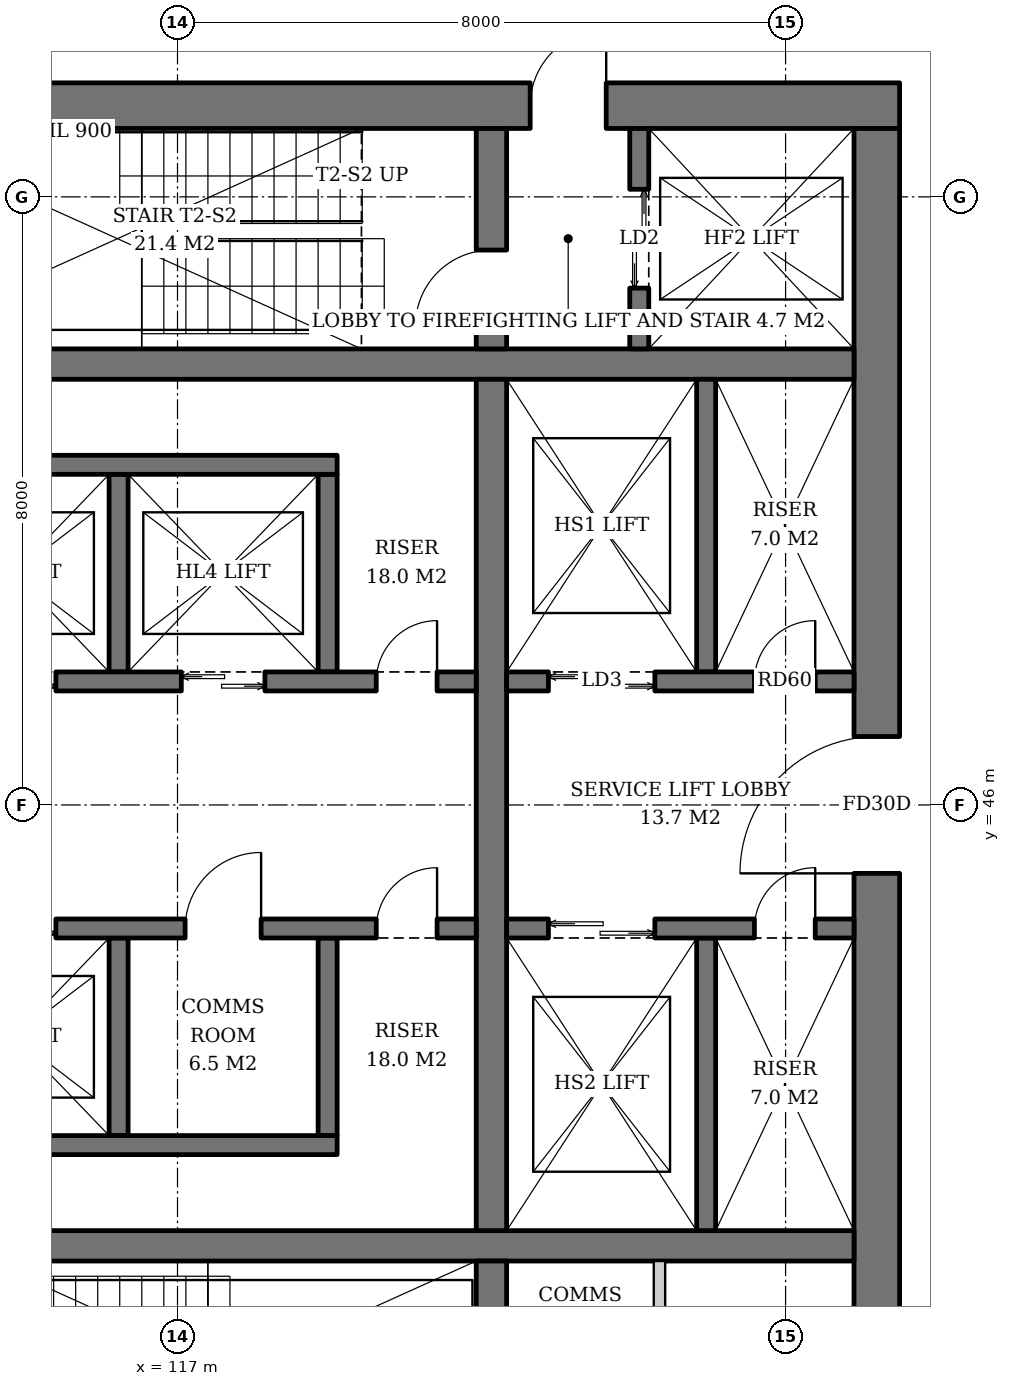
"""IFC4 building model, lengths in metres.
Left out: names, types, materials, properties, quantities, classifications, styles, units other than length and angle.
Written with IfcOpenShell. Run it as: python <this file> out.ifc"""

import sys

from ifc_helpers import new_model, si_unit, direction, frame, frame_2d, origin, place, context, subcontext, project, spatial, rectangle, extrude, element, fill, save


model = new_model("IFC4")
c1 = context("Model", 3, precision=1e-05, world=origin(), true_north=direction((0.0, 1.0)))
c2 = subcontext(c1, "Body", "Model", "MODEL_VIEW")
j1 = project(units=[si_unit("LENGTHUNIT", "METRE"), si_unit("PLANEANGLEUNIT", "RADIAN")], contexts=[c1])
p1 = place(None, origin())
s1 = spatial("IfcSite", under=j1, at=p1, CompositionType="ELEMENT")
p2 = place(p1, origin())
s2 = spatial("IfcBuilding", under=s1, at=p2, CompositionType="ELEMENT")
p3 = place(p2, frame((0.0, 0.0, 51.4)))
s3 = spatial("IfcBuildingStorey", under=s2, at=p3, CompositionType="ELEMENT", Elevation=51.4)
p4 = place(p3, frame((107.5, 55.2, 0.0), z_axis=(0.0, 0.0, 1.0), x_axis=(1.0, 0.0, 0.0)))
e1 = element("IfcWall", 1, at=p4, inside=s3, PredefinedType="SHEAR", context=c2, shape_type="SweptSolid", body=[
    extrude(rectangle(XDim=19.0, YDim=0.6, at=frame_2d((9.5, 0.0))), origin(), (0.0, 0.0, 1.0), 3.8),
])
p5 = place(p4, frame((14.14, 0.0, 0.0)))
e2 = element("IfcOpeningElement", 2, at=p5, cuts=e1, PredefinedType="OPENING", context=c2, shape_type="SweptSolid", body=[
    extrude(rectangle(XDim=1.0, YDim=2.1, at=frame_2d((0.5, 1.05))), frame((0.0, 0.31, 0.0), z_axis=(0.0, -1.0, 0.0), x_axis=(1.0, 0.0, 0.0)), (0.0, 0.0, 1.0), 0.62),
])
p6 = place(p4, frame((2.425, 0.0, 0.0)))
e3 = element("IfcOpeningElement", 3, at=p6, cuts=e1, PredefinedType="OPENING", context=c2, shape_type="SweptSolid", body=[
    extrude(rectangle(XDim=1.0, YDim=2.1, at=frame_2d((0.5, 1.05))), frame((0.0, 0.31, 0.0), z_axis=(0.0, -1.0, 0.0), x_axis=(1.0, 0.0, 0.0)), (0.0, 0.0, 1.0), 0.62),
])
p7 = place(p3, frame((126.2, 37.1, 0.0), z_axis=(0.0, 0.0, 1.0), x_axis=(0.0, 1.0, 0.0)))
e4 = element("IfcWall", 4, at=p7, inside=s3, PredefinedType="SHEAR", context=c2, shape_type="SweptSolid", body=[
    extrude(rectangle(XDim=17.8, YDim=0.6, at=frame_2d((8.9, 0.0))), origin(), (0.0, 0.0, 1.0), 3.8),
])
p8 = place(p7, frame((8.0, 0.0, 0.0)))
e5 = element("IfcOpeningElement", 5, at=p8, cuts=e4, PredefinedType="OPENING", context=c2, shape_type="SweptSolid", body=[
    extrude(rectangle(XDim=1.8, YDim=2.4, at=frame_2d((0.9, 1.2))), frame((0.0, 0.31, 0.0), z_axis=(0.0, -1.0, 0.0), x_axis=(1.0, 0.0, 0.0)), (0.0, 0.0, 1.0), 0.62),
])
for number, where, z_axis, x_axis in (
    (6, (108.1, 40.2, 0.0), (0.0, 0.0, 1.0), (1.0, 0.0, 0.0)),
    (7, (108.1, 51.8, 0.0), (0.0, 0.0, 1.0), (1.0, 0.0, 0.0)),
):
    element("IfcWall", number, at=place(p3, frame(where, z_axis=z_axis, x_axis=x_axis)), inside=s3, PredefinedType="SHEAR", context=c2, shape_type="SweptSolid", body=[
        extrude(rectangle(XDim=17.8, YDim=0.4, at=frame_2d((8.9, 0.0))), origin(), (0.0, 0.0, 1.0), 3.8),
    ])
p9 = place(p3, frame((121.13, 37.1, 0.0), z_axis=(0.0, 0.0, 1.0), x_axis=(0.0, 1.0, 0.0)))
e8 = element("IfcWall", 8, at=p9, inside=s3, PredefinedType="SHEAR", context=c2, shape_type="SweptSolid", body=[
    extrude(rectangle(XDim=2.9, YDim=0.4, at=frame_2d((1.45, 0.0))), origin(), (0.0, 0.0, 1.0), 3.8),
])
p10 = place(p3, frame((121.13, 40.4, 0.0), z_axis=(0.0, 0.0, 1.0), x_axis=(0.0, 1.0, 0.0)))
e9 = element("IfcWall", 9, at=p10, inside=s3, PredefinedType="SHEAR", context=c2, shape_type="SweptSolid", body=[
    extrude(rectangle(XDim=11.2, YDim=0.4, at=frame_2d((5.6, 0.0))), origin(), (0.0, 0.0, 1.0), 3.8),
])
p11 = place(p3, frame((121.13, 52.0, 0.0), z_axis=(0.0, 0.0, 1.0), x_axis=(0.0, 1.0, 0.0)))
e10 = element("IfcWall", 10, at=p11, inside=s3, PredefinedType="SHEAR", context=c2, shape_type="SweptSolid", body=[
    extrude(rectangle(XDim=2.9, YDim=0.4, at=frame_2d((1.45, 0.0))), origin(), (0.0, 0.0, 1.0), 3.8),
])
p12 = place(p11, frame((0.3, 0.0, 0.0)))
e11 = element("IfcOpeningElement", 11, at=p12, cuts=e10, PredefinedType="OPENING", context=c2, shape_type="SweptSolid", body=[
    extrude(rectangle(XDim=1.0, YDim=2.1, at=frame_2d((0.5, 1.05))), frame((0.0, 0.21, 0.0), z_axis=(0.0, -1.0, 0.0), x_axis=(1.0, 0.0, 0.0)), (0.0, 0.0, 1.0), 0.42),
])
p13 = place(p3, frame((123.075, 52.0, 0.0), z_axis=(0.0, 0.0, 1.0), x_axis=(0.0, 1.0, 0.0)))
e12 = element("IfcWall", 12, at=p13, inside=s3, PredefinedType="SHEAR", context=c2, shape_type="SweptSolid", body=[
    extrude(rectangle(XDim=2.9, YDim=0.25, at=frame_2d((1.45, 0.0))), origin(), (0.0, 0.0, 1.0), 3.8),
])
p14 = place(p13, frame((0.8, 0.0, 0.0)))
e13 = element("IfcOpeningElement", 13, at=p14, cuts=e12, PredefinedType="OPENING", context=c2, shape_type="SweptSolid", body=[
    extrude(rectangle(XDim=1.3, YDim=2.2, at=frame_2d((0.65, 1.1))), frame((0.0, 0.135, 0.0), z_axis=(0.0, -1.0, 0.0), x_axis=(1.0, 0.0, 0.0)), (0.0, 0.0, 1.0), 0.27),
])
for number, where, z_axis, x_axis in (
    (14, (116.225, 47.75, 0.0), (0.0, 0.0, 1.0), (0.0, 1.0, 0.0)),
    (15, (118.975, 47.75, 0.0), (0.0, 0.0, 1.0), (0.0, 1.0, 0.0)),
):
    element("IfcWall", number, at=place(p3, frame(where, z_axis=z_axis, x_axis=x_axis)), inside=s3, PredefinedType="SHEAR", context=c2, shape_type="SweptSolid", body=[
        extrude(rectangle(XDim=2.6, YDim=0.25, at=frame_2d((1.3, 0.0))), origin(), (0.0, 0.0, 1.0), 3.8),
    ])
p15 = place(p3, frame((108.1, 50.475, 0.0), z_axis=(0.0, 0.0, 1.0), x_axis=(1.0, 0.0, 0.0)))
e16 = element("IfcWall", 16, at=p15, inside=s3, PredefinedType="SHEAR", context=c2, shape_type="SweptSolid", body=[
    extrude(rectangle(XDim=11.0, YDim=0.25, at=frame_2d((5.5, 0.0))), origin(), (0.0, 0.0, 1.0), 3.8),
])
p16 = place(p3, frame((108.1, 47.625, 0.0), z_axis=(0.0, 0.0, 1.0), x_axis=(1.0, 0.0, 0.0)))
e17 = element("IfcWall", 17, at=p16, inside=s3, PredefinedType="SHEAR", context=c2, shape_type="SweptSolid", body=[
    extrude(rectangle(XDim=12.83, YDim=0.25, at=frame_2d((6.415, 0.0))), origin(), (0.0, 0.0, 1.0), 3.8),
])
p17 = place(p16, frame((0.7, 0.0, 0.0)))
e18 = element("IfcOpeningElement", 18, at=p17, cuts=e17, PredefinedType="OPENING", context=c2, shape_type="SweptSolid", body=[
    extrude(rectangle(XDim=1.1, YDim=2.2, at=frame_2d((0.55, 1.1))), frame((0.0, 0.135, 0.0), z_axis=(0.0, -1.0, 0.0), x_axis=(1.0, 0.0, 0.0)), (0.0, 0.0, 1.0), 0.27),
])
p18 = place(p16, frame((3.45, 0.0, 0.0)))
e19 = element("IfcOpeningElement", 19, at=p18, cuts=e17, PredefinedType="OPENING", context=c2, shape_type="SweptSolid", body=[
    extrude(rectangle(XDim=1.1, YDim=2.2, at=frame_2d((0.55, 1.1))), frame((0.0, 0.135, 0.0), z_axis=(0.0, -1.0, 0.0), x_axis=(1.0, 0.0, 0.0)), (0.0, 0.0, 1.0), 0.27),
])
p19 = place(p16, frame((6.2, 0.0, 0.0)))
e20 = element("IfcOpeningElement", 20, at=p19, cuts=e17, PredefinedType="OPENING", context=c2, shape_type="SweptSolid", body=[
    extrude(rectangle(XDim=1.1, YDim=2.2, at=frame_2d((0.55, 1.1))), frame((0.0, 0.135, 0.0), z_axis=(0.0, -1.0, 0.0), x_axis=(1.0, 0.0, 0.0)), (0.0, 0.0, 1.0), 0.27),
])
p20 = place(p16, frame((8.95, 0.0, 0.0)))
e21 = element("IfcOpeningElement", 21, at=p20, cuts=e17, PredefinedType="OPENING", context=c2, shape_type="SweptSolid", body=[
    extrude(rectangle(XDim=1.1, YDim=2.2, at=frame_2d((0.55, 1.1))), frame((0.0, 0.135, 0.0), z_axis=(0.0, -1.0, 0.0), x_axis=(1.0, 0.0, 0.0)), (0.0, 0.0, 1.0), 0.27),
])
p21 = place(p16, frame((11.515, 0.0, 0.0)))
e22 = element("IfcOpeningElement", 22, at=p21, cuts=e17, PredefinedType="OPENING", context=c2, shape_type="SweptSolid", body=[
    extrude(rectangle(XDim=0.8, YDim=2.0, at=frame_2d((0.4, 1.0))), frame((0.0, 0.135, 0.0), z_axis=(0.0, -1.0, 0.0), x_axis=(1.0, 0.0, 0.0)), (0.0, 0.0, 1.0), 0.27),
])
for number, where, z_axis, x_axis in (
    (23, (116.225, 44.25, 0.0), (0.0, 0.0, 1.0), (0.0, -1.0, 0.0)),
    (24, (118.975, 44.25, 0.0), (0.0, 0.0, 1.0), (0.0, -1.0, 0.0)),
):
    element("IfcWall", number, at=place(p3, frame(where, z_axis=z_axis, x_axis=x_axis)), inside=s3, PredefinedType="SHEAR", context=c2, shape_type="SweptSolid", body=[
        extrude(rectangle(XDim=2.6, YDim=0.25, at=frame_2d((1.3, 0.0))), origin(), (0.0, 0.0, 1.0), 3.8),
    ])
p22 = place(p3, frame((108.1, 41.525, 0.0), z_axis=(0.0, 0.0, 1.0), x_axis=(1.0, 0.0, 0.0)))
e25 = element("IfcWall", 25, at=p22, inside=s3, PredefinedType="SHEAR", context=c2, shape_type="SweptSolid", body=[
    extrude(rectangle(XDim=11.0, YDim=0.25, at=frame_2d((5.5, 0.0))), origin(), (0.0, 0.0, 1.0), 3.8),
])
p23 = place(p3, frame((108.1, 44.375, 0.0), z_axis=(0.0, 0.0, 1.0), x_axis=(1.0, 0.0, 0.0)))
e26 = element("IfcWall", 26, at=p23, inside=s3, PredefinedType="SHEAR", context=c2, shape_type="SweptSolid", body=[
    extrude(rectangle(XDim=12.83, YDim=0.25, at=frame_2d((6.415, 0.0))), origin(), (0.0, 0.0, 1.0), 3.8),
])
p24 = place(p23, frame((0.7, 0.0, 0.0)))
e27 = element("IfcOpeningElement", 27, at=p24, cuts=e26, PredefinedType="OPENING", context=c2, shape_type="SweptSolid", body=[
    extrude(rectangle(XDim=1.1, YDim=2.2, at=frame_2d((0.55, 1.1))), frame((0.0, 0.135, 0.0), z_axis=(0.0, -1.0, 0.0), x_axis=(1.0, 0.0, 0.0)), (0.0, 0.0, 1.0), 0.27),
])
p25 = place(p23, frame((3.45, 0.0, 0.0)))
e28 = element("IfcOpeningElement", 28, at=p25, cuts=e26, PredefinedType="OPENING", context=c2, shape_type="SweptSolid", body=[
    extrude(rectangle(XDim=1.1, YDim=2.2, at=frame_2d((0.55, 1.1))), frame((0.0, 0.135, 0.0), z_axis=(0.0, -1.0, 0.0), x_axis=(1.0, 0.0, 0.0)), (0.0, 0.0, 1.0), 0.27),
])
p26 = place(p23, frame((6.2, 0.0, 0.0)))
e29 = element("IfcOpeningElement", 29, at=p26, cuts=e26, PredefinedType="OPENING", context=c2, shape_type="SweptSolid", body=[
    extrude(rectangle(XDim=1.1, YDim=2.2, at=frame_2d((0.55, 1.1))), frame((0.0, 0.135, 0.0), z_axis=(0.0, -1.0, 0.0), x_axis=(1.0, 0.0, 0.0)), (0.0, 0.0, 1.0), 0.27),
])
p27 = place(p23, frame((9.0, 0.0, 0.0)))
e30 = element("IfcOpeningElement", 30, at=p27, cuts=e26, PredefinedType="OPENING", context=c2, shape_type="SweptSolid", body=[
    extrude(rectangle(XDim=1.0, YDim=2.1, at=frame_2d((0.5, 1.05))), frame((0.0, 0.135, 0.0), z_axis=(0.0, -1.0, 0.0), x_axis=(1.0, 0.0, 0.0)), (0.0, 0.0, 1.0), 0.27),
])
p28 = place(p23, frame((11.515, 0.0, 0.0)))
e31 = element("IfcOpeningElement", 31, at=p28, cuts=e26, PredefinedType="OPENING", context=c2, shape_type="SweptSolid", body=[
    extrude(rectangle(XDim=0.8, YDim=2.0, at=frame_2d((0.4, 1.0))), frame((0.0, 0.135, 0.0), z_axis=(0.0, -1.0, 0.0), x_axis=(1.0, 0.0, 0.0)), (0.0, 0.0, 1.0), 0.27),
])
p29 = place(p3, frame((123.955, 47.75, 0.0), z_axis=(0.0, 0.0, 1.0), x_axis=(0.0, 1.0, 0.0)))
e32 = element("IfcWall", 32, at=p29, inside=s3, PredefinedType="SHEAR", context=c2, shape_type="SweptSolid", body=[
    extrude(rectangle(XDim=3.85, YDim=0.25, at=frame_2d((1.925, 0.0))), origin(), (0.0, 0.0, 1.0), 3.8),
])
p30 = place(p3, frame((121.33, 47.625, 0.0), z_axis=(0.0, 0.0, 1.0), x_axis=(1.0, 0.0, 0.0)))
e33 = element("IfcWall", 33, at=p30, inside=s3, PredefinedType="SHEAR", context=c2, shape_type="SweptSolid", body=[
    extrude(rectangle(XDim=4.57, YDim=0.25, at=frame_2d((2.285, 0.0))), origin(), (0.0, 0.0, 1.0), 3.8),
])
p31 = place(p30, frame((0.55, 0.0, 0.0)))
e34 = element("IfcOpeningElement", 34, at=p31, cuts=e33, PredefinedType="OPENING", context=c2, shape_type="SweptSolid", body=[
    extrude(rectangle(XDim=1.4, YDim=2.4, at=frame_2d((0.7, 1.2))), frame((0.0, 0.135, 0.0), z_axis=(0.0, -1.0, 0.0), x_axis=(1.0, 0.0, 0.0)), (0.0, 0.0, 1.0), 0.27),
])
p32 = place(p30, frame((3.26, 0.0, 0.0)))
e35 = element("IfcOpeningElement", 35, at=p32, cuts=e33, PredefinedType="OPENING", context=c2, shape_type="SweptSolid", body=[
    extrude(rectangle(XDim=0.8, YDim=2.0, at=frame_2d((0.4, 1.0))), frame((0.0, 0.135, 0.0), z_axis=(0.0, -1.0, 0.0), x_axis=(1.0, 0.0, 0.0)), (0.0, 0.0, 1.0), 0.27),
])
p33 = place(p3, frame((123.955, 44.25, 0.0), z_axis=(0.0, 0.0, 1.0), x_axis=(0.0, -1.0, 0.0)))
e36 = element("IfcWall", 36, at=p33, inside=s3, PredefinedType="SHEAR", context=c2, shape_type="SweptSolid", body=[
    extrude(rectangle(XDim=3.85, YDim=0.25, at=frame_2d((1.925, 0.0))), origin(), (0.0, 0.0, 1.0), 3.8),
])
p34 = place(p3, frame((121.33, 44.375, 0.0), z_axis=(0.0, 0.0, 1.0), x_axis=(1.0, 0.0, 0.0)))
e37 = element("IfcWall", 37, at=p34, inside=s3, PredefinedType="SHEAR", context=c2, shape_type="SweptSolid", body=[
    extrude(rectangle(XDim=4.57, YDim=0.25, at=frame_2d((2.285, 0.0))), origin(), (0.0, 0.0, 1.0), 3.8),
])
p35 = place(p34, frame((0.55, 0.0, 0.0)))
e38 = element("IfcOpeningElement", 38, at=p35, cuts=e37, PredefinedType="OPENING", context=c2, shape_type="SweptSolid", body=[
    extrude(rectangle(XDim=1.4, YDim=2.4, at=frame_2d((0.7, 1.2))), frame((0.0, 0.135, 0.0), z_axis=(0.0, -1.0, 0.0), x_axis=(1.0, 0.0, 0.0)), (0.0, 0.0, 1.0), 0.27),
])
p36 = place(p34, frame((3.26, 0.0, 0.0)))
e39 = element("IfcOpeningElement", 39, at=p36, cuts=e37, PredefinedType="OPENING", context=c2, shape_type="SweptSolid", body=[
    extrude(rectangle(XDim=0.8, YDim=2.0, at=frame_2d((0.4, 1.0))), frame((0.0, 0.135, 0.0), z_axis=(0.0, -1.0, 0.0), x_axis=(1.0, 0.0, 0.0)), (0.0, 0.0, 1.0), 0.27),
])
p37 = place(p3, frame((123.341, 37.1, 0.0), z_axis=(0.0, 0.0, 1.0), x_axis=(0.0, 1.0, 0.0)))
e40 = element("IfcWall", 40, at=p37, inside=s3, PredefinedType="SOLIDWALL", context=c2, shape_type="SweptSolid", body=[
    extrude(rectangle(XDim=2.9, YDim=0.15, at=frame_2d((1.45, 0.0))), origin(), (0.0, 0.0, 1.0), 3.6),
])
p38 = place(p14, origin())
e41 = element("IfcDoor", 41, at=p38, inside=s3, OperationType="DOUBLE_DOOR_SLIDING", PredefinedType="DOOR", context=c2, shape_type="SweptSolid", body=[
    extrude(rectangle(XDim=1.3, YDim=2.2, at=frame_2d((0.65, 1.1))), frame((0.0, 0.025, 0.0), z_axis=(0.0, -1.0, 0.0), x_axis=(1.0, 0.0, 0.0)), (0.0, 0.0, 1.0), 0.05),
])
fill(e13, e41)
p39 = place(p19, origin())
e42 = element("IfcDoor", 42, at=p39, inside=s3, OperationType="DOUBLE_DOOR_SLIDING", PredefinedType="DOOR", context=c2, shape_type="SweptSolid", body=[
    extrude(rectangle(XDim=1.1, YDim=2.2, at=frame_2d((0.55, 1.1))), frame((0.0, 0.025, 0.0), z_axis=(0.0, -1.0, 0.0), x_axis=(1.0, 0.0, 0.0)), (0.0, 0.0, 1.0), 0.05),
])
fill(e20, e42)
p40 = place(p20, origin())
e43 = element("IfcDoor", 43, at=p40, inside=s3, OperationType="DOUBLE_DOOR_SLIDING", PredefinedType="DOOR", context=c2, shape_type="SweptSolid", body=[
    extrude(rectangle(XDim=1.1, YDim=2.2, at=frame_2d((0.55, 1.1))), frame((0.0, 0.025, 0.0), z_axis=(0.0, -1.0, 0.0), x_axis=(1.0, 0.0, 0.0)), (0.0, 0.0, 1.0), 0.05),
])
fill(e21, e43)
p41 = place(p21, origin())
e44 = element("IfcDoor", 44, at=p41, inside=s3, OperationType="SINGLE_SWING_RIGHT", PredefinedType="DOOR", context=c2, shape_type="SweptSolid", body=[
    extrude(rectangle(XDim=0.8, YDim=2.0, at=frame_2d((0.4, 1.0))), frame((0.0, 0.025, 0.0), z_axis=(0.0, -1.0, 0.0), x_axis=(1.0, 0.0, 0.0)), (0.0, 0.0, 1.0), 0.05),
])
fill(e22, e44)
p42 = place(p26, origin())
e45 = element("IfcDoor", 45, at=p42, inside=s3, OperationType="DOUBLE_DOOR_SLIDING", PredefinedType="DOOR", context=c2, shape_type="SweptSolid", body=[
    extrude(rectangle(XDim=1.1, YDim=2.2, at=frame_2d((0.55, 1.1))), frame((0.0, 0.025, 0.0), z_axis=(0.0, -1.0, 0.0), x_axis=(1.0, 0.0, 0.0)), (0.0, 0.0, 1.0), 0.05),
])
fill(e29, e45)
p43 = place(p27, origin())
e46 = element("IfcDoor", 46, at=p43, inside=s3, OperationType="SINGLE_SWING_RIGHT", PredefinedType="DOOR", context=c2, shape_type="SweptSolid", body=[
    extrude(rectangle(XDim=1.0, YDim=2.1, at=frame_2d((0.5, 1.05))), frame((0.0, 0.025, 0.0), z_axis=(0.0, -1.0, 0.0), x_axis=(1.0, 0.0, 0.0)), (0.0, 0.0, 1.0), 0.05),
])
fill(e30, e46)
p44 = place(p28, origin())
e47 = element("IfcDoor", 47, at=p44, inside=s3, OperationType="SINGLE_SWING_RIGHT", PredefinedType="DOOR", context=c2, shape_type="SweptSolid", body=[
    extrude(rectangle(XDim=0.8, YDim=2.0, at=frame_2d((0.4, 1.0))), frame((0.0, 0.025, 0.0), z_axis=(0.0, -1.0, 0.0), x_axis=(1.0, 0.0, 0.0)), (0.0, 0.0, 1.0), 0.05),
])
fill(e31, e47)
p45 = place(p31, origin())
e48 = element("IfcDoor", 48, at=p45, inside=s3, OperationType="DOUBLE_DOOR_SLIDING", PredefinedType="DOOR", context=c2, shape_type="SweptSolid", body=[
    extrude(rectangle(XDim=1.4, YDim=2.4, at=frame_2d((0.7, 1.2))), frame((0.0, 0.025, 0.0), z_axis=(0.0, -1.0, 0.0), x_axis=(1.0, 0.0, 0.0)), (0.0, 0.0, 1.0), 0.05),
])
fill(e34, e48)
p46 = place(p32, origin())
e49 = element("IfcDoor", 49, at=p46, inside=s3, OperationType="SINGLE_SWING_RIGHT", PredefinedType="DOOR", context=c2, shape_type="SweptSolid", body=[
    extrude(rectangle(XDim=0.8, YDim=2.0, at=frame_2d((0.4, 1.0))), frame((0.0, 0.025, 0.0), z_axis=(0.0, -1.0, 0.0), x_axis=(1.0, 0.0, 0.0)), (0.0, 0.0, 1.0), 0.05),
])
fill(e35, e49)
p47 = place(p35, origin())
e50 = element("IfcDoor", 50, at=p47, inside=s3, OperationType="DOUBLE_DOOR_SLIDING", PredefinedType="DOOR", context=c2, shape_type="SweptSolid", body=[
    extrude(rectangle(XDim=1.4, YDim=2.4, at=frame_2d((0.7, 1.2))), frame((0.0, 0.025, 0.0), z_axis=(0.0, -1.0, 0.0), x_axis=(1.0, 0.0, 0.0)), (0.0, 0.0, 1.0), 0.05),
])
fill(e38, e50)
p48 = place(p36, origin())
e51 = element("IfcDoor", 51, at=p48, inside=s3, OperationType="SINGLE_SWING_RIGHT", PredefinedType="DOOR", context=c2, shape_type="SweptSolid", body=[
    extrude(rectangle(XDim=0.8, YDim=2.0, at=frame_2d((0.4, 1.0))), frame((0.0, 0.025, 0.0), z_axis=(0.0, -1.0, 0.0), x_axis=(1.0, 0.0, 0.0)), (0.0, 0.0, 1.0), 0.05),
])
fill(e39, e51)
p49 = place(p12, origin())
e52 = element("IfcDoor", 52, at=p49, inside=s3, OperationType="SINGLE_SWING_LEFT", PredefinedType="DOOR", context=c2, shape_type="SweptSolid", body=[
    extrude(rectangle(XDim=1.0, YDim=2.1, at=frame_2d((0.5, 1.05))), frame((0.0, 0.025, 0.0), z_axis=(0.0, -1.0, 0.0), x_axis=(1.0, 0.0, 0.0)), (0.0, 0.0, 1.0), 0.05),
])
fill(e11, e52)
p50 = place(p5, origin())
e53 = element("IfcDoor", 53, at=p50, inside=s3, OperationType="SINGLE_SWING_RIGHT", PredefinedType="DOOR", context=c2, shape_type="SweptSolid", body=[
    extrude(rectangle(XDim=1.0, YDim=2.1, at=frame_2d((0.5, 1.05))), frame((0.0, 0.025, 0.0), z_axis=(0.0, -1.0, 0.0), x_axis=(1.0, 0.0, 0.0)), (0.0, 0.0, 1.0), 0.05),
])
fill(e2, e53)
p51 = place(p8, origin())
e54 = element("IfcDoor", 54, at=p51, inside=s3, OperationType="DOUBLE_DOOR_SINGLE_SWING", PredefinedType="DOOR", context=c2, shape_type="SweptSolid", body=[
    extrude(rectangle(XDim=1.8, YDim=2.4, at=frame_2d((0.9, 1.2))), frame((0.0, 0.025, 0.0), z_axis=(0.0, -1.0, 0.0), x_axis=(1.0, 0.0, 0.0)), (0.0, 0.0, 1.0), 0.05),
])
fill(e5, e54)
save(model, sys.argv[1])
